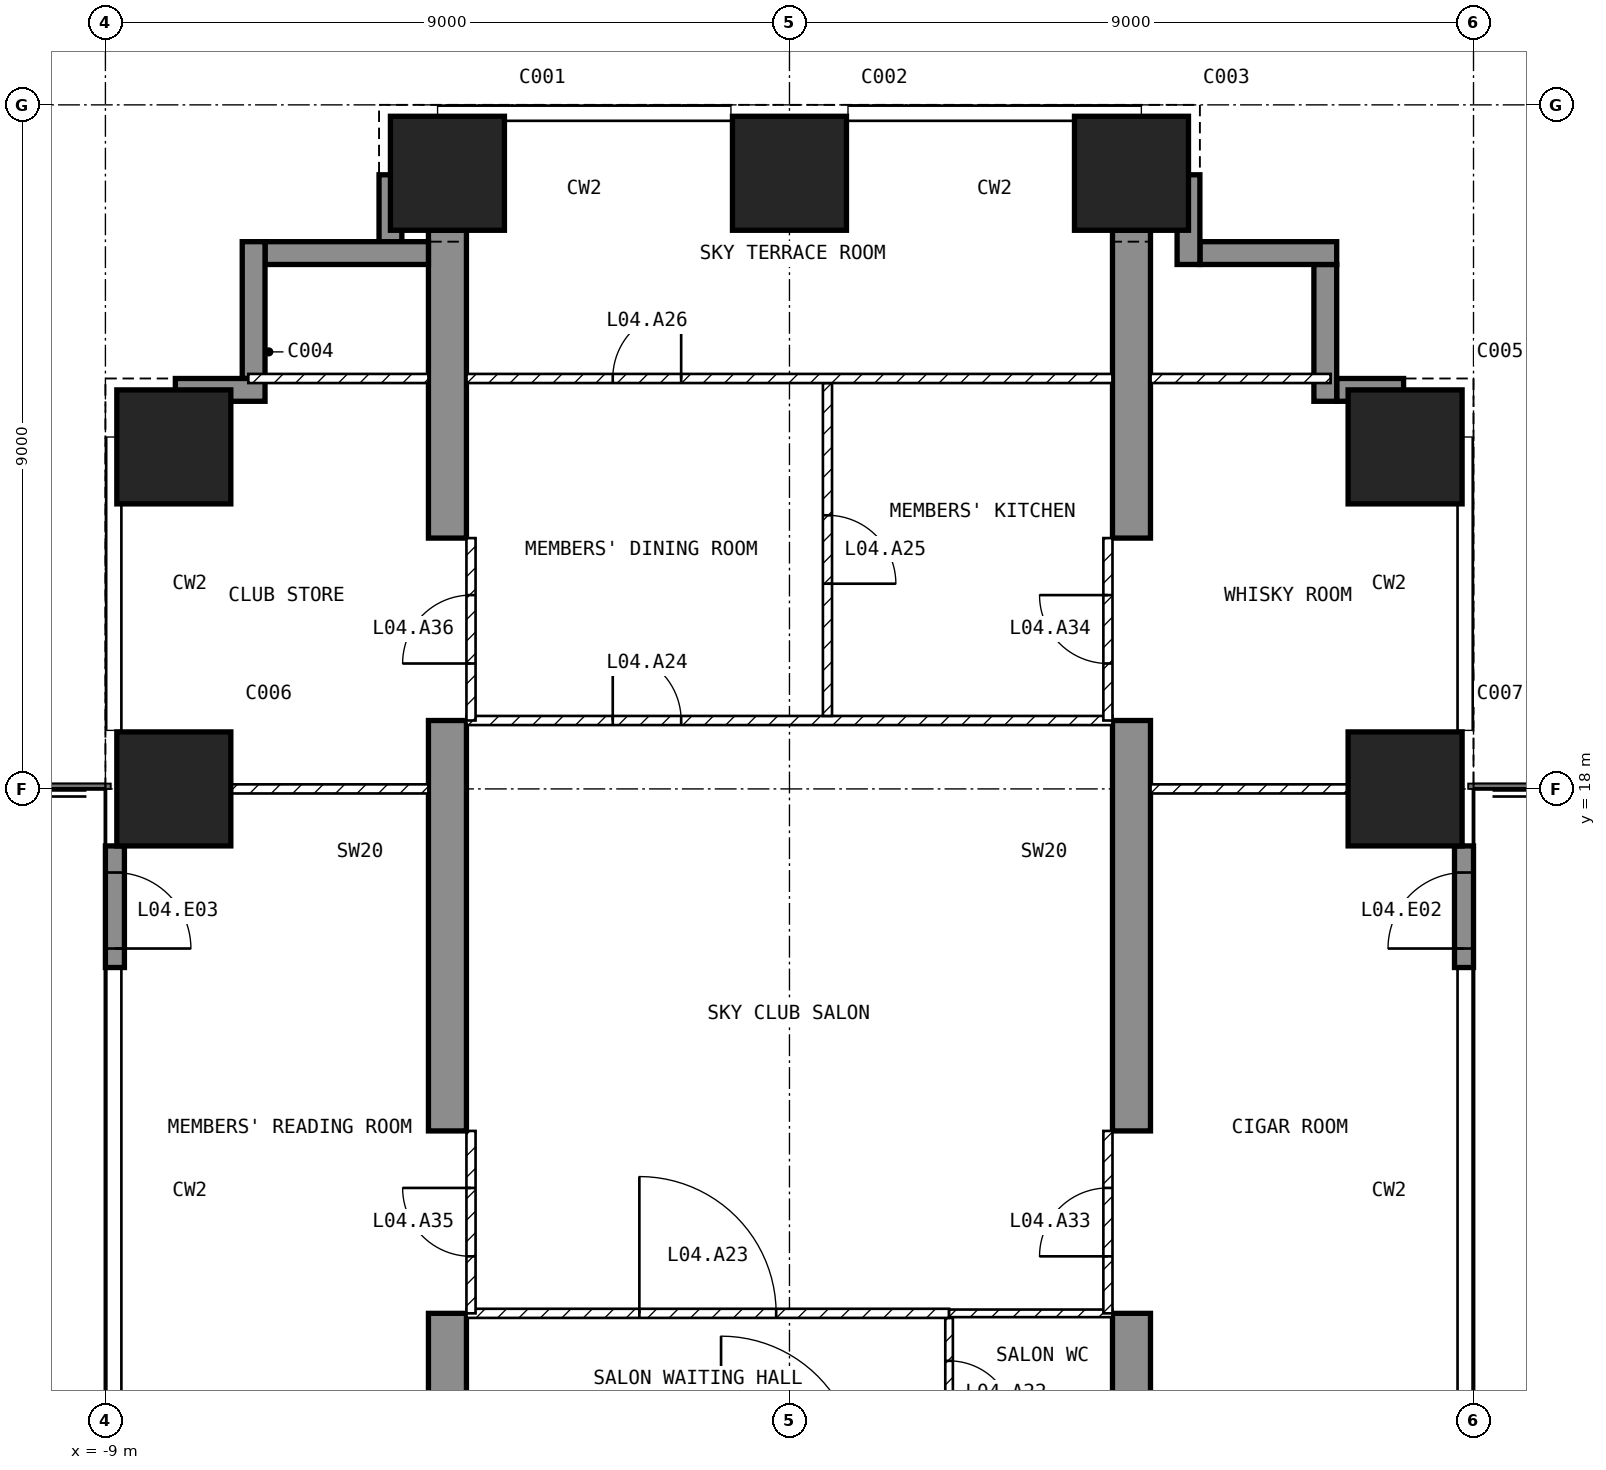
"""IFC4 building model, lengths in metres.
Left out: names, types, materials, properties, quantities, classifications, styles, units other than length and angle.
Written with IfcOpenShell. Run it as: python <this file> out.ifc"""

import sys

from ifc_helpers import new_model, si_unit, direction, frame, frame_2d, origin, origin_2d, place, context, subcontext, project, spatial, polyline, rectangle, outline, extrude, element, fill, save


model = new_model("IFC4")
c1 = context("Model", 3, precision=1e-05, world=origin(), true_north=direction((0.0, 1.0)))
c2 = subcontext(c1, "Body", "Model", "MODEL_VIEW")
j1 = project(units=[si_unit("LENGTHUNIT", "METRE"), si_unit("PLANEANGLEUNIT", "RADIAN")], contexts=[c1])
p1 = place(None, origin())
s1 = spatial("IfcSite", under=j1, at=p1, CompositionType="ELEMENT")
p2 = place(p1, origin())
s2 = spatial("IfcBuilding", under=s1, at=p2, CompositionType="ELEMENT")
p3 = place(p2, frame((0.0, 0.0, 32.0)))
s3 = spatial("IfcBuildingStorey", under=s2, at=p3, CompositionType="ELEMENT", Elevation=32.0)
for number, where, z_axis, x_axis in (
    (1, (-8.1, 18.0, -0.3), (0.0, 0.0, 1.0), (1.0, 0.0, 0.0)),
    (2, (-8.1, 22.5, -0.3), (0.0, 0.0, 1.0), (1.0, 0.0, 0.0)),
    (3, (-4.5, 26.1, -0.3), (0.0, 0.0, 1.0), (1.0, 0.0, 0.0)),
    (4, (0.0, 26.1, -0.3), (0.0, 0.0, 1.0), (1.0, 0.0, 0.0)),
    (5, (4.5, 26.1, -0.3), (0.0, 0.0, 1.0), (1.0, 0.0, 0.0)),
    (6, (8.1, 18.0, -0.3), (0.0, 0.0, 1.0), (1.0, 0.0, 0.0)),
    (7, (8.1, 22.5, -0.3), (0.0, 0.0, 1.0), (1.0, 0.0, 0.0)),
):
    element("IfcColumn", number, at=place(p3, frame(where, z_axis=z_axis, x_axis=x_axis)), inside=s3, PredefinedType="COLUMN", context=c2, shape_type="SweptSolid", body=[
        extrude(rectangle(XDim=1.5, YDim=1.5, at=origin_2d()), origin(), (0.0, 0.0, 1.0), 4.55),
    ])
for number, where, z_axis, x_axis in (
    (8, (-4.75, 9.0, -0.3), (1.0, 0.0, 0.0), (0.0, 1.0, 0.0)),
    (9, (4.25, 9.0, -0.3), (1.0, 0.0, 0.0), (0.0, 1.0, 0.0)),
):
    element("IfcWall", number, at=place(p3, frame(where, z_axis=z_axis, x_axis=x_axis)), inside=s3, PredefinedType="SHEAR", context=c2, shape_type="SweptSolid", body=[
        extrude(outline(polyline([(0.0, 0.0), (2.1, 0.0), (2.1, 2.7), (4.5, 2.7), (4.5, 0.0), (9.9, 0.0), (9.9, 2.7), (12.3, 2.7), (12.3, 0.0), (16.35, 0.0), (16.35, 4.55), (0.0, 4.55), (0.0, 0.0)])), origin(), (0.0, 0.0, 1.0), 0.5),
    ])
p4 = place(p3, frame((8.875, 15.65, 0.0), z_axis=(0.0, 0.0, 1.0), x_axis=(0.0, 1.0, 0.0)))
e10 = element("IfcWall", 10, at=p4, inside=s3, PredefinedType="SOLIDWALL", context=c2, shape_type="SweptSolid", body=[
    extrude(rectangle(XDim=1.6, YDim=0.25, at=frame_2d((0.8, 0.0))), origin(), (0.0, 0.0, 1.0), 4.25),
])
p5 = place(p4, frame((0.25, 0.0, 0.0)))
e11 = element("IfcOpeningElement", 11, at=p5, cuts=e10, PredefinedType="OPENING", context=c2, shape_type="SweptSolid", body=[
    extrude(rectangle(XDim=1.0, YDim=2.4, at=frame_2d((0.5, 1.2))), frame((0.0, 0.135, 0.0), z_axis=(0.0, -1.0, 0.0), x_axis=(1.0, 0.0, 0.0)), (0.0, 0.0, 1.0), 0.27),
])
p6 = place(p3, frame((-8.875, 17.25, 0.0), z_axis=(0.0, 0.0, 1.0), x_axis=(0.0, -1.0, 0.0)))
e12 = element("IfcWall", 12, at=p6, inside=s3, PredefinedType="SOLIDWALL", context=c2, shape_type="SweptSolid", body=[
    extrude(rectangle(XDim=1.6, YDim=0.25, at=frame_2d((0.8, 0.0))), origin(), (0.0, 0.0, 1.0), 4.25),
])
p7 = place(p6, frame((0.35, 0.0, 0.0)))
e13 = element("IfcOpeningElement", 13, at=p7, cuts=e12, PredefinedType="OPENING", context=c2, shape_type="SweptSolid", body=[
    extrude(rectangle(XDim=1.0, YDim=2.4, at=frame_2d((0.5, 1.2))), frame((0.0, 0.135, 0.0), z_axis=(0.0, -1.0, 0.0), x_axis=(1.0, 0.0, 0.0)), (0.0, 0.0, 1.0), 0.27),
])
p8 = place(p3, frame((8.08, 23.25, 0.0), z_axis=(0.0, 0.0, 1.0), x_axis=(-1.0, 0.0, 0.0)))
e14 = element("IfcWall", 14, at=p8, inside=s3, PredefinedType="SOLIDWALL", context=c2, shape_type="SweptSolid", body=[
    extrude(rectangle(XDim=0.88, YDim=0.3, at=frame_2d((0.44, 0.0))), origin(), (0.0, 0.0, 1.0), 4.25),
])
p9 = place(p3, frame((7.05, 23.1, 0.0), z_axis=(0.0, 0.0, 1.0), x_axis=(0.0, 1.0, 0.0)))
e15 = element("IfcWall", 15, at=p9, inside=s3, PredefinedType="SOLIDWALL", context=c2, shape_type="SweptSolid", body=[
    extrude(rectangle(XDim=1.8, YDim=0.3, at=frame_2d((0.9, 0.0))), origin(), (0.0, 0.0, 1.0), 4.25),
])
p10 = place(p3, frame((7.2, 25.05, 0.0), z_axis=(0.0, 0.0, 1.0), x_axis=(-1.0, 0.0, 0.0)))
e16 = element("IfcWall", 16, at=p10, inside=s3, PredefinedType="SOLIDWALL", context=c2, shape_type="SweptSolid", body=[
    extrude(rectangle(XDim=1.8, YDim=0.3, at=frame_2d((0.9, 0.0))), origin(), (0.0, 0.0, 1.0), 4.25),
])
p11 = place(p3, frame((5.25, 24.9, 0.0), z_axis=(0.0, 0.0, 1.0), x_axis=(0.0, 1.0, 0.0)))
e17 = element("IfcWall", 17, at=p11, inside=s3, PredefinedType="SOLIDWALL", context=c2, shape_type="SweptSolid", body=[
    extrude(rectangle(XDim=1.18, YDim=0.3, at=frame_2d((0.59, 0.0))), origin(), (0.0, 0.0, 1.0), 4.25),
])
p12 = place(p3, frame((-5.25, 26.08, 0.0), z_axis=(0.0, 0.0, 1.0), x_axis=(0.0, -1.0, 0.0)))
e18 = element("IfcWall", 18, at=p12, inside=s3, PredefinedType="SOLIDWALL", context=c2, shape_type="SweptSolid", body=[
    extrude(rectangle(XDim=0.88, YDim=0.3, at=frame_2d((0.44, 0.0))), origin(), (0.0, 0.0, 1.0), 4.25),
])
p13 = place(p3, frame((-4.75, 25.05, 0.0), z_axis=(0.0, 0.0, 1.0), x_axis=(-1.0, 0.0, 0.0)))
e19 = element("IfcWall", 19, at=p13, inside=s3, PredefinedType="SOLIDWALL", context=c2, shape_type="SweptSolid", body=[
    extrude(rectangle(XDim=2.15, YDim=0.3, at=frame_2d((1.075, 0.0))), origin(), (0.0, 0.0, 1.0), 4.25),
])
p14 = place(p3, frame((-7.05, 25.2, 0.0), z_axis=(0.0, 0.0, 1.0), x_axis=(0.0, -1.0, 0.0)))
e20 = element("IfcWall", 20, at=p14, inside=s3, PredefinedType="SOLIDWALL", context=c2, shape_type="SweptSolid", body=[
    extrude(rectangle(XDim=1.8, YDim=0.3, at=frame_2d((0.9, 0.0))), origin(), (0.0, 0.0, 1.0), 4.25),
])
p15 = place(p3, frame((-6.9, 23.25, 0.0), z_axis=(0.0, 0.0, 1.0), x_axis=(-1.0, 0.0, 0.0)))
e21 = element("IfcWall", 21, at=p15, inside=s3, PredefinedType="SOLIDWALL", context=c2, shape_type="SweptSolid", body=[
    extrude(rectangle(XDim=1.18, YDim=0.3, at=frame_2d((0.59, 0.0))), origin(), (0.0, 0.0, 1.0), 4.25),
])
p16 = place(p3, frame((2.1, 11.04, 0.0), z_axis=(0.0, 0.0, 1.0), x_axis=(0.0, -1.0, 0.0)))
e22 = element("IfcWall", 22, at=p16, inside=s3, PredefinedType="PARTITIONING", context=c2, shape_type="SweptSolid", body=[
    extrude(rectangle(XDim=1.98, YDim=0.1, at=frame_2d((0.99, 0.0))), origin(), (0.0, 0.0, 1.0), 4.25),
])
p17 = place(p16, frame((0.565, 0.0, 0.0)))
e23 = element("IfcOpeningElement", 23, at=p17, cuts=e22, PredefinedType="OPENING", context=c2, shape_type="SweptSolid", body=[
    extrude(rectangle(XDim=0.85, YDim=2.1, at=frame_2d((0.425, 1.05))), frame((0.0, 0.06, 0.0), z_axis=(0.0, -1.0, 0.0), x_axis=(1.0, 0.0, 0.0)), (0.0, 0.0, 1.0), 0.12),
])
p18 = place(p3, frame((-4.25, 11.1, 0.0), z_axis=(0.0, 0.0, 1.0), x_axis=(1.0, 0.0, 0.0)))
e24 = element("IfcWall", 24, at=p18, inside=s3, PredefinedType="PARTITIONING", context=c2, shape_type="SweptSolid", body=[
    extrude(rectangle(XDim=6.35, YDim=0.12, at=frame_2d((3.175, 0.0))), origin(), (0.0, 0.0, 1.0), 4.25),
])
p19 = place(p18, frame((2.275, 0.0, 0.0)))
e25 = element("IfcOpeningElement", 25, at=p19, cuts=e24, PredefinedType="OPENING", context=c2, shape_type="SweptSolid", body=[
    extrude(rectangle(XDim=1.8, YDim=2.1, at=frame_2d((0.9, 1.05))), frame((0.0, 0.07, 0.0), z_axis=(0.0, -1.0, 0.0), x_axis=(1.0, 0.0, 0.0)), (0.0, 0.0, 1.0), 0.14),
])
p20 = place(p3, frame((2.1, 11.1, 0.0), z_axis=(0.0, 0.0, 1.0), x_axis=(1.0, 0.0, 0.0)))
e26 = element("IfcWall", 26, at=p20, inside=s3, PredefinedType="PARTITIONING", context=c2, shape_type="SweptSolid", body=[
    extrude(rectangle(XDim=2.15, YDim=0.1, at=frame_2d((1.075, 0.0))), origin(), (0.0, 0.0, 1.0), 4.25),
])
p21 = place(p3, frame((-4.25, 18.9, 0.0), z_axis=(0.0, 0.0, 1.0), x_axis=(1.0, 0.0, 0.0)))
e27 = element("IfcWall", 27, at=p21, inside=s3, PredefinedType="PARTITIONING", context=c2, shape_type="SweptSolid", body=[
    extrude(rectangle(XDim=8.5, YDim=0.12, at=frame_2d((4.25, 0.0))), origin(), (0.0, 0.0, 1.0), 4.25),
])
p22 = place(p21, frame((1.925, 0.0, 0.0)))
e28 = element("IfcOpeningElement", 28, at=p22, cuts=e27, PredefinedType="OPENING", context=c2, shape_type="SweptSolid", body=[
    extrude(rectangle(XDim=0.9, YDim=2.1, at=frame_2d((0.45, 1.05))), frame((0.0, 0.07, 0.0), z_axis=(0.0, -1.0, 0.0), x_axis=(1.0, 0.0, 0.0)), (0.0, 0.0, 1.0), 0.14),
])
p23 = place(p3, frame((0.5, 23.34, 0.0), z_axis=(0.0, 0.0, 1.0), x_axis=(0.0, -1.0, 0.0)))
e29 = element("IfcWall", 29, at=p23, inside=s3, PredefinedType="PARTITIONING", context=c2, shape_type="SweptSolid", body=[
    extrude(rectangle(XDim=4.38, YDim=0.12, at=frame_2d((2.19, 0.0))), origin(), (0.0, 0.0, 1.0), 4.25),
])
p24 = place(p23, frame((1.74, 0.0, 0.0)))
e30 = element("IfcOpeningElement", 30, at=p24, cuts=e29, PredefinedType="OPENING", context=c2, shape_type="SweptSolid", body=[
    extrude(rectangle(XDim=0.9, YDim=2.1, at=frame_2d((0.45, 1.05))), frame((0.0, 0.07, 0.0), z_axis=(0.0, -1.0, 0.0), x_axis=(1.0, 0.0, 0.0)), (0.0, 0.0, 1.0), 0.14),
])
p25 = place(p3, frame((-4.25, 23.4, 0.0), z_axis=(0.0, 0.0, 1.0), x_axis=(1.0, 0.0, 0.0)))
e31 = element("IfcWall", 31, at=p25, inside=s3, PredefinedType="PARTITIONING", context=c2, shape_type="SweptSolid", body=[
    extrude(rectangle(XDim=8.5, YDim=0.12, at=frame_2d((4.25, 0.0))), origin(), (0.0, 0.0, 1.0), 4.25),
])
p26 = place(p25, frame((1.925, 0.0, 0.0)))
e32 = element("IfcOpeningElement", 32, at=p26, cuts=e31, PredefinedType="OPENING", context=c2, shape_type="SweptSolid", body=[
    extrude(rectangle(XDim=0.9, YDim=2.1, at=frame_2d((0.45, 1.05))), frame((0.0, 0.07, 0.0), z_axis=(0.0, -1.0, 0.0), x_axis=(1.0, 0.0, 0.0)), (0.0, 0.0, 1.0), 0.14),
])
p27 = place(p3, frame((4.75, 18.0, 0.0), z_axis=(0.0, 0.0, 1.0), x_axis=(1.0, 0.0, 0.0)))
e33 = element("IfcWall", 33, at=p27, inside=s3, PredefinedType="PARTITIONING", context=c2, shape_type="SweptSolid", body=[
    extrude(rectangle(XDim=2.6, YDim=0.12, at=frame_2d((1.3, 0.0))), origin(), (0.0, 0.0, 1.0), 3.346),
])
p28 = place(p3, frame((4.75, 23.4, 0.0), z_axis=(0.0, 0.0, 1.0), x_axis=(1.0, 0.0, 0.0)))
e34 = element("IfcWall", 34, at=p28, inside=s3, PredefinedType="PARTITIONING", context=c2, shape_type="SweptSolid", body=[
    extrude(rectangle(XDim=2.37, YDim=0.12, at=frame_2d((1.185, 0.0))), origin(), (0.0, 0.0, 1.0), 4.25),
])
p29 = place(p3, frame((-7.35, 18.0, 0.0), z_axis=(0.0, 0.0, 1.0), x_axis=(1.0, 0.0, 0.0)))
e35 = element("IfcWall", 35, at=p29, inside=s3, PredefinedType="PARTITIONING", context=c2, shape_type="SweptSolid", body=[
    extrude(rectangle(XDim=2.6, YDim=0.12, at=frame_2d((1.3, 0.0))), origin(), (0.0, 0.0, 1.0), 3.346),
])
p30 = place(p3, frame((-7.12, 23.4, 0.0), z_axis=(0.0, 0.0, 1.0), x_axis=(1.0, 0.0, 0.0)))
e36 = element("IfcWall", 36, at=p30, inside=s3, PredefinedType="PARTITIONING", context=c2, shape_type="SweptSolid", body=[
    extrude(rectangle(XDim=2.37, YDim=0.12, at=frame_2d((1.185, 0.0))), origin(), (0.0, 0.0, 1.0), 4.25),
])
p31 = place(p3, frame((4.19, 11.1, 0.0), z_axis=(0.0, 0.0, 1.0), x_axis=(0.0, 1.0, 0.0)))
e37 = element("IfcWall", 37, at=p31, inside=s3, PredefinedType="PARTITIONING", context=c2, shape_type="SweptSolid", body=[
    extrude(rectangle(XDim=2.4, YDim=0.12, at=frame_2d((1.2, 0.0))), origin(), (0.0, 0.0, 1.0), 2.4),
])
p32 = place(p31, frame((0.75, 0.0, 0.0)))
e38 = element("IfcOpeningElement", 38, at=p32, cuts=e37, PredefinedType="OPENING", context=c2, shape_type="SweptSolid", body=[
    extrude(rectangle(XDim=0.9, YDim=2.1, at=frame_2d((0.45, 1.05))), frame((0.0, 0.07, 0.0), z_axis=(0.0, -1.0, 0.0), x_axis=(1.0, 0.0, 0.0)), (0.0, 0.0, 1.0), 0.14),
])
p33 = place(p3, frame((4.19, 18.9, 0.0), z_axis=(0.0, 0.0, 1.0), x_axis=(0.0, 1.0, 0.0)))
e39 = element("IfcWall", 39, at=p33, inside=s3, PredefinedType="PARTITIONING", context=c2, shape_type="SweptSolid", body=[
    extrude(rectangle(XDim=2.4, YDim=0.12, at=frame_2d((1.2, 0.0))), origin(), (0.0, 0.0, 1.0), 2.4),
])
p34 = place(p33, frame((0.75, 0.0, 0.0)))
e40 = element("IfcOpeningElement", 40, at=p34, cuts=e39, PredefinedType="OPENING", context=c2, shape_type="SweptSolid", body=[
    extrude(rectangle(XDim=0.9, YDim=2.1, at=frame_2d((0.45, 1.05))), frame((0.0, 0.07, 0.0), z_axis=(0.0, -1.0, 0.0), x_axis=(1.0, 0.0, 0.0)), (0.0, 0.0, 1.0), 0.14),
])
p35 = place(p3, frame((-4.19, 11.1, 0.0), z_axis=(0.0, 0.0, 1.0), x_axis=(0.0, 1.0, 0.0)))
e41 = element("IfcWall", 41, at=p35, inside=s3, PredefinedType="PARTITIONING", context=c2, shape_type="SweptSolid", body=[
    extrude(rectangle(XDim=2.4, YDim=0.12, at=frame_2d((1.2, 0.0))), origin(), (0.0, 0.0, 1.0), 2.4),
])
p36 = place(p35, frame((0.75, 0.0, 0.0)))
e42 = element("IfcOpeningElement", 42, at=p36, cuts=e41, PredefinedType="OPENING", context=c2, shape_type="SweptSolid", body=[
    extrude(rectangle(XDim=0.9, YDim=2.1, at=frame_2d((0.45, 1.05))), frame((0.0, 0.07, 0.0), z_axis=(0.0, -1.0, 0.0), x_axis=(1.0, 0.0, 0.0)), (0.0, 0.0, 1.0), 0.14),
])
p37 = place(p3, frame((-4.19, 18.9, 0.0), z_axis=(0.0, 0.0, 1.0), x_axis=(0.0, 1.0, 0.0)))
e43 = element("IfcWall", 43, at=p37, inside=s3, PredefinedType="PARTITIONING", context=c2, shape_type="SweptSolid", body=[
    extrude(rectangle(XDim=2.4, YDim=0.12, at=frame_2d((1.2, 0.0))), origin(), (0.0, 0.0, 1.0), 2.4),
])
p38 = place(p37, frame((0.75, 0.0, 0.0)))
e44 = element("IfcOpeningElement", 44, at=p38, cuts=e43, PredefinedType="OPENING", context=c2, shape_type="SweptSolid", body=[
    extrude(rectangle(XDim=0.9, YDim=2.1, at=frame_2d((0.45, 1.05))), frame((0.0, 0.07, 0.0), z_axis=(0.0, -1.0, 0.0), x_axis=(1.0, 0.0, 0.0)), (0.0, 0.0, 1.0), 0.14),
])
p39 = place(p5, origin())
e45 = element("IfcDoor", 45, at=p39, inside=s3, OperationType="SINGLE_SWING_LEFT", PredefinedType="DOOR", context=c2, shape_type="SweptSolid", body=[
    extrude(rectangle(XDim=1.0, YDim=2.4, at=frame_2d((0.5, 1.2))), frame((0.0, 0.025, 0.0), z_axis=(0.0, -1.0, 0.0), x_axis=(1.0, 0.0, 0.0)), (0.0, 0.0, 1.0), 0.05),
])
fill(e11, e45)
p40 = place(p7, origin())
e46 = element("IfcDoor", 46, at=p40, inside=s3, OperationType="SINGLE_SWING_RIGHT", PredefinedType="DOOR", context=c2, shape_type="SweptSolid", body=[
    extrude(rectangle(XDim=1.0, YDim=2.4, at=frame_2d((0.5, 1.2))), frame((0.0, 0.025, 0.0), z_axis=(0.0, -1.0, 0.0), x_axis=(1.0, 0.0, 0.0)), (0.0, 0.0, 1.0), 0.05),
])
fill(e13, e46)
p41 = place(p17, origin())
e47 = element("IfcDoor", 47, at=p41, inside=s3, OperationType="SINGLE_SWING_RIGHT", PredefinedType="DOOR", context=c2, shape_type="SweptSolid", body=[
    extrude(rectangle(XDim=0.85, YDim=2.1, at=frame_2d((0.425, 1.05))), frame((0.0, 0.025, 0.0), z_axis=(0.0, -1.0, 0.0), x_axis=(1.0, 0.0, 0.0)), (0.0, 0.0, 1.0), 0.05),
])
fill(e23, e47)
p42 = place(p19, origin())
e48 = element("IfcDoor", 48, at=p42, inside=s3, OperationType="SINGLE_SWING_LEFT", PredefinedType="DOOR", context=c2, shape_type="SweptSolid", body=[
    extrude(rectangle(XDim=1.8, YDim=2.1, at=frame_2d((0.9, 1.05))), frame((0.0, 0.025, 0.0), z_axis=(0.0, -1.0, 0.0), x_axis=(1.0, 0.0, 0.0)), (0.0, 0.0, 1.0), 0.05),
])
fill(e25, e48)
p43 = place(p22, origin())
e49 = element("IfcDoor", 49, at=p43, inside=s3, OperationType="SINGLE_SWING_LEFT", PredefinedType="DOOR", context=c2, shape_type="SweptSolid", body=[
    extrude(rectangle(XDim=0.9, YDim=2.1, at=frame_2d((0.45, 1.05))), frame((0.0, 0.025, 0.0), z_axis=(0.0, -1.0, 0.0), x_axis=(1.0, 0.0, 0.0)), (0.0, 0.0, 1.0), 0.05),
])
fill(e28, e49)
p44 = place(p24, origin())
e50 = element("IfcDoor", 50, at=p44, inside=s3, OperationType="SINGLE_SWING_RIGHT", PredefinedType="DOOR", context=c2, shape_type="SweptSolid", body=[
    extrude(rectangle(XDim=0.9, YDim=2.1, at=frame_2d((0.45, 1.05))), frame((0.0, 0.025, 0.0), z_axis=(0.0, -1.0, 0.0), x_axis=(1.0, 0.0, 0.0)), (0.0, 0.0, 1.0), 0.05),
])
fill(e30, e50)
p45 = place(p26, origin())
e51 = element("IfcDoor", 51, at=p45, inside=s3, OperationType="SINGLE_SWING_RIGHT", PredefinedType="DOOR", context=c2, shape_type="SweptSolid", body=[
    extrude(rectangle(XDim=0.9, YDim=2.1, at=frame_2d((0.45, 1.05))), frame((0.0, 0.025, 0.0), z_axis=(0.0, -1.0, 0.0), x_axis=(1.0, 0.0, 0.0)), (0.0, 0.0, 1.0), 0.05),
])
fill(e32, e51)
p46 = place(p32, origin())
e52 = element("IfcDoor", 52, at=p46, inside=s3, OperationType="SINGLE_SWING_LEFT", PredefinedType="DOOR", context=c2, shape_type="SweptSolid", body=[
    extrude(rectangle(XDim=0.9, YDim=2.1, at=frame_2d((0.45, 1.05))), frame((0.0, 0.025, 0.0), z_axis=(0.0, -1.0, 0.0), x_axis=(1.0, 0.0, 0.0)), (0.0, 0.0, 1.0), 0.05),
])
fill(e38, e52)
p47 = place(p34, origin())
e53 = element("IfcDoor", 53, at=p47, inside=s3, OperationType="SINGLE_SWING_RIGHT", PredefinedType="DOOR", context=c2, shape_type="SweptSolid", body=[
    extrude(rectangle(XDim=0.9, YDim=2.1, at=frame_2d((0.45, 1.05))), frame((0.0, 0.025, 0.0), z_axis=(0.0, -1.0, 0.0), x_axis=(1.0, 0.0, 0.0)), (0.0, 0.0, 1.0), 0.05),
])
fill(e40, e53)
p48 = place(p36, origin())
e54 = element("IfcDoor", 54, at=p48, inside=s3, OperationType="SINGLE_SWING_RIGHT", PredefinedType="DOOR", context=c2, shape_type="SweptSolid", body=[
    extrude(rectangle(XDim=0.9, YDim=2.1, at=frame_2d((0.45, 1.05))), frame((0.0, 0.025, 0.0), z_axis=(0.0, -1.0, 0.0), x_axis=(1.0, 0.0, 0.0)), (0.0, 0.0, 1.0), 0.05),
])
fill(e42, e54)
p49 = place(p38, origin())
e55 = element("IfcDoor", 55, at=p49, inside=s3, OperationType="SINGLE_SWING_LEFT", PredefinedType="DOOR", context=c2, shape_type="SweptSolid", body=[
    extrude(rectangle(XDim=0.9, YDim=2.1, at=frame_2d((0.45, 1.05))), frame((0.0, 0.025, 0.0), z_axis=(0.0, -1.0, 0.0), x_axis=(1.0, 0.0, 0.0)), (0.0, 0.0, 1.0), 0.05),
])
fill(e44, e55)
save(model, sys.argv[1])
